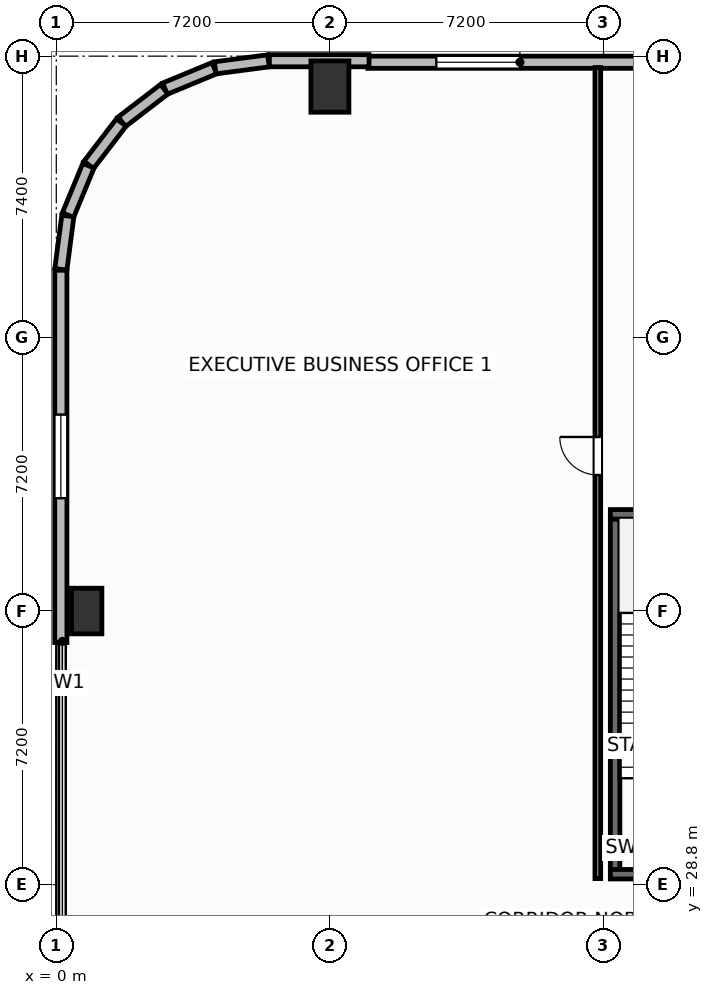
"""IFC4 building model, lengths in metres.
Left out: names, types, materials, properties, quantities, classifications, styles, units other than length and angle.
Written with IfcOpenShell. Run it as: python <this file> out.ifc"""

import sys

from ifc_helpers import new_model, si_unit, direction, frame, frame_2d, origin, origin_2d, place, context, subcontext, project, spatial, rectangle, extrude, element, fill, save


model = new_model("IFC4")
c1 = context("Model", 3, precision=1e-05, world=origin(), true_north=direction((0.0, 1.0)))
c2 = subcontext(c1, "Body", "Model", "MODEL_VIEW")
j1 = project(units=[si_unit("LENGTHUNIT", "METRE"), si_unit("PLANEANGLEUNIT", "RADIAN")], contexts=[c1])
p1 = place(None, origin())
s1 = spatial("IfcSite", under=j1, at=p1, CompositionType="ELEMENT")
p2 = place(p1, origin())
s2 = spatial("IfcBuilding", under=s1, at=p2, CompositionType="ELEMENT")
p3 = place(p2, frame((0.0, 0.0, 10.8)))
s3 = spatial("IfcBuildingStorey", under=s2, at=p3, CompositionType="ELEMENT", Elevation=10.8)
p4 = place(p3, frame((14.705, 29.2, 0.0), z_axis=(0.0, 0.0, 1.0), x_axis=(0.0, 1.0, 0.0)))
e1 = element("IfcWall", 1, at=p4, inside=s3, PredefinedType="SHEAR", context=c2, shape_type="SweptSolid", body=[
    extrude(rectangle(XDim=9.22, YDim=0.25, at=frame_2d((4.61, 0.0))), origin(), (0.0, 0.0, 1.0), 5.12),
])
for number, where, z_axis, x_axis in (
    (2, (14.58, 38.545, 0.0), (0.0, 0.0, 1.0), (1.0, 0.0, 0.0)),
    (3, (14.58, 29.075, 0.0), (0.0, 0.0, 1.0), (1.0, 0.0, 0.0)),
):
    element("IfcWall", number, at=place(p3, frame(where, z_axis=z_axis, x_axis=x_axis)), inside=s3, PredefinedType="SHEAR", context=c2, shape_type="SweptSolid", body=[
        extrude(rectangle(XDim=3.89, YDim=0.25, at=frame_2d((1.945, 0.0))), origin(), (0.0, 0.0, 1.0), 5.12),
    ])
p5 = place(p3, frame((7.2, 49.8, 0.0), z_axis=(0.0, 0.0, 1.0), x_axis=(1.0, 0.0, 0.0)))
e4 = element("IfcColumn", 4, at=p5, inside=s3, PredefinedType="COLUMN", context=c2, shape_type="SweptSolid", body=[
    extrude(rectangle(XDim=1.0, YDim=1.35, at=origin_2d()), origin(), (0.0, 0.0, 1.0), 5.4),
])
p6 = place(p3, frame((0.8, 36.0, 0.0), z_axis=(0.0, 0.0, 1.0), x_axis=(1.0, 0.0, 0.0)))
e5 = element("IfcColumn", 5, at=p6, inside=s3, PredefinedType="PILASTER", context=c2, shape_type="SweptSolid", body=[
    extrude(rectangle(XDim=0.8, YDim=1.2, at=origin_2d()), origin(), (0.0, 0.0, 1.0), 5.4),
])
p7 = place(p3, frame((8.2, 50.44, 0.0), z_axis=(0.0, 0.0, 1.0), x_axis=(1.0, 0.0, 0.0)))
e6 = element("IfcWall", 6, at=p7, inside=s3, PredefinedType="SOLIDWALL", context=c2, shape_type="SweptSolid", body=[
    extrude(rectangle(XDim=15.2, YDim=0.32, at=frame_2d((7.6, 0.0))), origin(), (0.0, 0.0, 1.0), 4.07),
])
p8 = place(p7, frame((1.8, 0.0, 0.8)))
e7 = element("IfcOpeningElement", 7, at=p8, cuts=e6, PredefinedType="OPENING", context=c2, shape_type="SweptSolid", body=[
    extrude(rectangle(XDim=2.2, YDim=1.85, at=frame_2d((1.1, 0.925))), frame((0.0, 0.17, 0.0), z_axis=(0.0, -1.0, 0.0), x_axis=(1.0, 0.0, 0.0)), (0.0, 0.0, 1.0), 0.34),
])
p9 = place(p7, frame((11.2, 0.0, 0.8)))
e8 = element("IfcOpeningElement", 8, at=p9, cuts=e6, PredefinedType="OPENING", context=c2, shape_type="SweptSolid", body=[
    extrude(rectangle(XDim=2.2, YDim=1.85, at=frame_2d((1.1, 0.925))), frame((0.0, 0.17, 0.0), z_axis=(0.0, -1.0, 0.0), x_axis=(1.0, 0.0, 0.0)), (0.0, 0.0, 1.0), 0.34),
])
p10 = place(p3, frame((8.23, 50.48, 0.0), z_axis=(0.0, 0.0, 1.0), x_axis=(-1.0, 0.0, 0.0)))
e9 = element("IfcWall", 9, at=p10, inside=s3, PredefinedType="SOLIDWALL", context=c2, shape_type="SweptSolid", body=[
    extrude(rectangle(XDim=2.622, YDim=0.32, at=frame_2d((1.311, 0.0))), origin(), (0.0, 0.0, 1.0), 4.07),
])
p11 = place(p3, frame((5.583, 50.477, 0.0), z_axis=(0.0, 0.0, 1.0), x_axis=(-0.991434880626, -0.130601981138, 0.0)))
e10 = element("IfcWall", 10, at=p11, inside=s3, PredefinedType="SOLIDWALL", context=c2, shape_type="SweptSolid", body=[
    extrude(rectangle(XDim=1.413, YDim=0.32, at=frame_2d((0.707, 0.0))), origin(), (0.0, 0.0, 1.0), 4.07),
])
p12 = place(p3, frame((4.159, 50.283, 0.0), z_axis=(0.0, 0.0, 1.0), x_axis=(-0.923841042178, -0.382776343035, 0.0)))
e11 = element("IfcWall", 11, at=p12, inside=s3, PredefinedType="SOLIDWALL", context=c2, shape_type="SweptSolid", body=[
    extrude(rectangle(XDim=1.405, YDim=0.32, at=frame_2d((0.703, 0.0))), origin(), (0.0, 0.0, 1.0), 4.07),
])
p13 = place(p3, frame((2.841, 49.73, 0.0), z_axis=(0.0, 0.0, 1.0), x_axis=(-0.79338541907, -0.60871962085, 0.0)))
e12 = element("IfcWall", 12, at=p13, inside=s3, PredefinedType="SOLIDWALL", context=c2, shape_type="SweptSolid", body=[
    extrude(rectangle(XDim=1.405, YDim=0.32, at=frame_2d((0.703, 0.0))), origin(), (0.0, 0.0, 1.0), 4.07),
])
p14 = place(p3, frame((1.711, 48.854, 0.0), z_axis=(0.0, 0.0, 1.0), x_axis=(-0.608828954222, -0.793301521807, 0.0)))
e13 = element("IfcWall", 13, at=p14, inside=s3, PredefinedType="SOLIDWALL", context=c2, shape_type="SweptSolid", body=[
    extrude(rectangle(XDim=1.406, YDim=0.32, at=frame_2d((0.703, 0.0))), origin(), (0.0, 0.0, 1.0), 4.07),
])
p15 = place(p3, frame((0.846, 47.716, 0.0), z_axis=(0.0, 0.0, 1.0), x_axis=(-0.382924622758, -0.923779591291, 0.0)))
e14 = element("IfcWall", 14, at=p15, inside=s3, PredefinedType="SOLIDWALL", context=c2, shape_type="SweptSolid", body=[
    extrude(rectangle(XDim=1.405, YDim=0.32, at=frame_2d((0.703, 0.0))), origin(), (0.0, 0.0, 1.0), 4.07),
])
p16 = place(p3, frame((0.304, 46.393, 0.0), z_axis=(0.0, 0.0, 1.0), x_axis=(-0.130432168094, -0.991457235349, 0.0)))
e15 = element("IfcWall", 15, at=p16, inside=s3, PredefinedType="SOLIDWALL", context=c2, shape_type="SweptSolid", body=[
    extrude(rectangle(XDim=1.413, YDim=0.32, at=frame_2d((0.707, 0.0))), origin(), (0.0, 0.0, 1.0), 4.07),
])
p17 = place(p3, frame((0.12, 44.967, 0.0), z_axis=(0.0, 0.0, 1.0), x_axis=(0.0, -1.0, 0.0)))
e16 = element("IfcWall", 16, at=p17, inside=s3, PredefinedType="SOLIDWALL", context=c2, shape_type="SweptSolid", body=[
    extrude(rectangle(XDim=9.797, YDim=0.32, at=frame_2d((4.898, 0.0))), origin(), (0.0, 0.0, 1.0), 4.07),
])
p18 = place(p17, frame((3.799, 0.0, 0.8)))
e17 = element("IfcOpeningElement", 17, at=p18, cuts=e16, PredefinedType="OPENING", context=c2, shape_type="SweptSolid", body=[
    extrude(rectangle(XDim=2.2, YDim=2.0, at=frame_2d((1.1, 1.0))), frame((0.0, 0.17, 0.0), z_axis=(0.0, -1.0, 0.0), x_axis=(1.0, 0.0, 0.0)), (0.0, 0.0, 1.0), 0.34),
])
p19 = place(p3, frame((14.25, 28.96, 0.0), z_axis=(0.0, 0.0, 1.0), x_axis=(0.0, 1.0, 0.0)))
e18 = element("IfcWall", 18, at=p19, inside=s3, PredefinedType="PARTITIONING", context=c2, shape_type="SweptSolid", body=[
    extrude(rectangle(XDim=21.34, YDim=0.15, at=frame_2d((10.67, 0.0))), origin(), (0.0, 0.0, 1.0), 5.12),
])
p20 = place(p19, frame((10.62, 0.0, 0.0)))
e19 = element("IfcOpeningElement", 19, at=p20, cuts=e18, PredefinedType="OPENING", context=c2, shape_type="SweptSolid", body=[
    extrude(rectangle(XDim=1.0, YDim=2.05, at=frame_2d((0.5, 1.025))), frame((0.0, 0.085, 0.0), z_axis=(0.0, -1.0, 0.0), x_axis=(1.0, 0.0, 0.0)), (0.0, 0.0, 1.0), 0.17),
])
p21 = place(p8, origin())
e20 = element("IfcWindow", 20, at=p21, inside=s3, PartitioningType="SINGLE_PANEL", PredefinedType="WINDOW", context=c2, shape_type="SweptSolid", body=[
    extrude(rectangle(XDim=2.2, YDim=1.85, at=frame_2d((1.1, 0.925))), frame((0.0, 0.03, 0.0), z_axis=(0.0, -1.0, 0.0), x_axis=(1.0, 0.0, 0.0)), (0.0, 0.0, 1.0), 0.06),
])
fill(e7, e20)
p22 = place(p18, origin())
e21 = element("IfcWindow", 21, at=p22, inside=s3, PartitioningType="SINGLE_PANEL", PredefinedType="WINDOW", context=c2, shape_type="SweptSolid", body=[
    extrude(rectangle(XDim=2.2, YDim=2.0, at=frame_2d((1.1, 1.0))), frame((0.0, 0.03, 0.0), z_axis=(0.0, -1.0, 0.0), x_axis=(1.0, 0.0, 0.0)), (0.0, 0.0, 1.0), 0.06),
])
fill(e17, e21)
p23 = place(p20, origin())
e22 = element("IfcDoor", 22, at=p23, inside=s3, OperationType="SINGLE_SWING_RIGHT", PredefinedType="DOOR", context=c2, shape_type="SweptSolid", body=[
    extrude(rectangle(XDim=1.0, YDim=2.05, at=frame_2d((0.5, 1.025))), frame((0.0, 0.025, 0.0), z_axis=(0.0, -1.0, 0.0), x_axis=(1.0, 0.0, 0.0)), (0.0, 0.0, 1.0), 0.05),
])
fill(e19, e22)
save(model, sys.argv[1])
